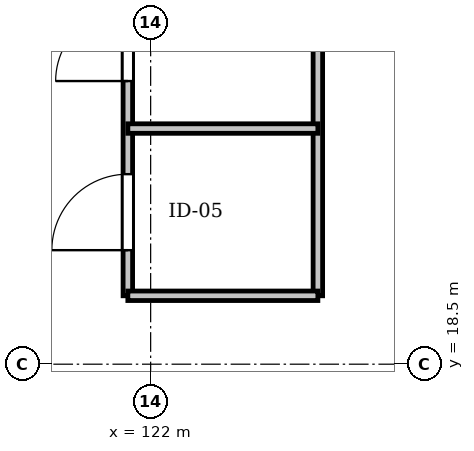
"""IFC4 building model, lengths in metres.
Left out: names, types, materials, properties, quantities, classifications, styles, units other than length and angle.
Written with IfcOpenShell. Run it as: python <this file> out.ifc"""

import sys

from ifc_helpers import new_model, si_unit, direction, frame, frame_2d, origin, place, context, subcontext, project, spatial, rectangle, extrude, element, fill, save


model = new_model("IFC4")
c1 = context("Model", 3, precision=1e-05, world=origin(), true_north=direction((0.0, 1.0)))
c2 = subcontext(c1, "Body", "Model", "MODEL_VIEW")
j1 = project(units=[si_unit("LENGTHUNIT", "METRE"), si_unit("PLANEANGLEUNIT", "RADIAN")], contexts=[c1])
p1 = place(None, origin())
s1 = spatial("IfcSite", under=j1, at=p1, CompositionType="ELEMENT")
p2 = place(p1, origin())
s2 = spatial("IfcBuilding", under=s1, at=p2, CompositionType="ELEMENT")
p3 = place(p2, frame((0.0, 0.0, 5.4)))
s3 = spatial("IfcBuildingStorey", under=s2, at=p3, CompositionType="ELEMENT", Elevation=5.4)
p4 = place(p3, frame((121.7, 19.4, 0.0), z_axis=(0.0, 0.0, 1.0), x_axis=(0.0, 1.0, 0.0)))
e1 = element("IfcWall", 1, at=p4, inside=s3, PredefinedType="PARTITIONING", context=c2, shape_type="SweptSolid", body=[
    extrude(rectangle(XDim=6.6, YDim=0.125, at=frame_2d((3.3, 0.0))), origin(), (0.0, 0.0, 1.0), 4.52),
])
p5 = place(p4, frame((0.6, 0.0, 0.0)))
e2 = element("IfcOpeningElement", 2, at=p5, cuts=e1, PredefinedType="OPENING", context=c2, shape_type="SweptSolid", body=[
    extrude(rectangle(XDim=1.0, YDim=2.2, at=frame_2d((0.5, 1.1))), frame((0.0, 0.073, 0.0), z_axis=(0.0, -1.0, 0.0), x_axis=(1.0, 0.0, 0.0)), (0.0, 0.0, 1.0), 0.145),
])
p6 = place(p4, frame((2.825, 0.0, 0.0)))
e3 = element("IfcOpeningElement", 3, at=p6, cuts=e1, PredefinedType="OPENING", context=c2, shape_type="SweptSolid", body=[
    extrude(rectangle(XDim=0.95, YDim=2.2, at=frame_2d((0.475, 1.1))), frame((0.0, 0.073, 0.0), z_axis=(0.0, -1.0, 0.0), x_axis=(1.0, 0.0, 0.0)), (0.0, 0.0, 1.0), 0.145),
])
p7 = place(p4, frame((5.025, 0.0, 0.0)))
e4 = element("IfcOpeningElement", 4, at=p7, cuts=e1, PredefinedType="OPENING", context=c2, shape_type="SweptSolid", body=[
    extrude(rectangle(XDim=0.95, YDim=2.2, at=frame_2d((0.475, 1.1))), frame((0.0, 0.073, 0.0), z_axis=(0.0, -1.0, 0.0), x_axis=(1.0, 0.0, 0.0)), (0.0, 0.0, 1.0), 0.145),
])
p8 = place(p3, frame((124.2, 19.4, 0.0), z_axis=(0.0, 0.0, 1.0), x_axis=(0.0, 1.0, 0.0)))
e5 = element("IfcWall", 5, at=p8, inside=s3, PredefinedType="PARTITIONING", context=c2, shape_type="SweptSolid", body=[
    extrude(rectangle(XDim=6.6, YDim=0.125, at=frame_2d((3.3, 0.0))), origin(), (0.0, 0.0, 1.0), 4.52),
])
for number, where, z_axis, x_axis in (
    (6, (121.7, 19.4, 0.0), (0.0, 0.0, 1.0), (1.0, 0.0, 0.0)),
    (7, (121.7, 21.6, 0.0), (0.0, 0.0, 1.0), (1.0, 0.0, 0.0)),
):
    element("IfcWall", number, at=place(p3, frame(where, z_axis=z_axis, x_axis=x_axis)), inside=s3, PredefinedType="PARTITIONING", context=c2, shape_type="SweptSolid", body=[
        extrude(rectangle(XDim=2.5, YDim=0.125, at=frame_2d((1.25, 0.0))), origin(), (0.0, 0.0, 1.0), 3.92),
    ])
p9 = place(p5, origin())
e8 = element("IfcDoor", 8, at=p9, inside=s3, OperationType="SINGLE_SWING_RIGHT", PredefinedType="DOOR", context=c2, shape_type="SweptSolid", body=[
    extrude(rectangle(XDim=1.0, YDim=2.2, at=frame_2d((0.5, 1.1))), frame((0.0, 0.025, 0.0), z_axis=(0.0, -1.0, 0.0), x_axis=(1.0, 0.0, 0.0)), (0.0, 0.0, 1.0), 0.05),
])
fill(e2, e8)
p10 = place(p6, origin())
e9 = element("IfcDoor", 9, at=p10, inside=s3, OperationType="SINGLE_SWING_LEFT", PredefinedType="DOOR", context=c2, shape_type="SweptSolid", body=[
    extrude(rectangle(XDim=0.95, YDim=2.2, at=frame_2d((0.475, 1.1))), frame((0.0, 0.025, 0.0), z_axis=(0.0, -1.0, 0.0), x_axis=(1.0, 0.0, 0.0)), (0.0, 0.0, 1.0), 0.05),
])
fill(e3, e9)
save(model, sys.argv[1])
